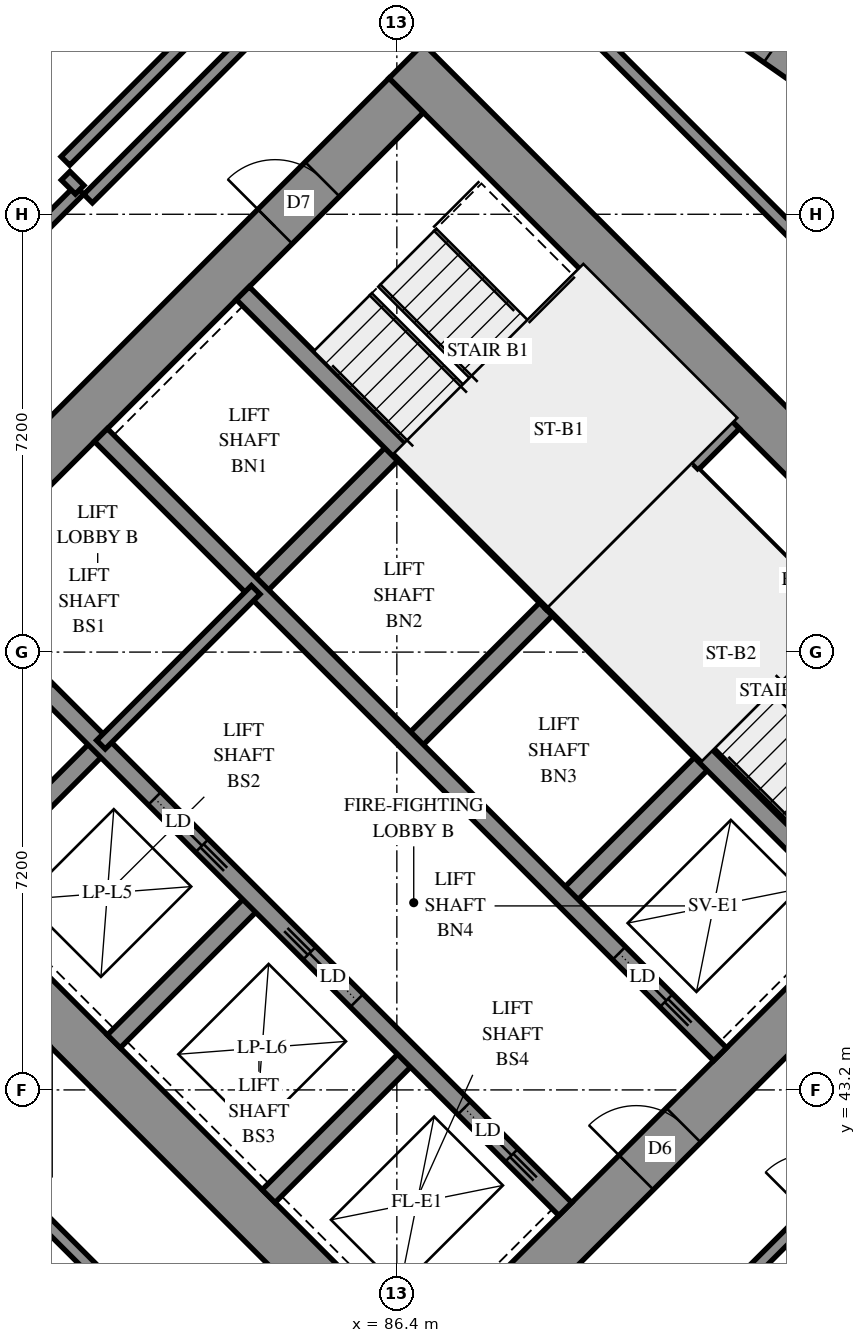
"""IFC4 building model, lengths in metres.
Left out: names, types, materials, properties, quantities, classifications, styles, units other than length and angle.
Written with IfcOpenShell. Run it as: python <this file> out.ifc"""

import sys

from ifc_helpers import new_model, si_unit, direction, frame, frame_2d, origin, place, context, subcontext, project, spatial, polyline, rectangle, outline, extrude, element, fill, save


model = new_model("IFC4")
c1 = context("Model", 3, precision=1e-05, world=origin(), true_north=direction((0.0, 1.0)))
c2 = subcontext(c1, "Body", "Model", "MODEL_VIEW")
j1 = project(units=[si_unit("LENGTHUNIT", "METRE"), si_unit("PLANEANGLEUNIT", "RADIAN")], contexts=[c1])
p1 = place(None, origin())
s1 = spatial("IfcSite", under=j1, at=p1, CompositionType="ELEMENT")
p2 = place(p1, origin())
s2 = spatial("IfcBuilding", under=s1, at=p2, CompositionType="ELEMENT")
p3 = place(p2, frame((0.0, 0.0, 115.2)))
s3 = spatial("IfcBuildingStorey", under=s2, at=p3, CompositionType="ELEMENT", Elevation=115.2)
p4 = place(p3, frame((75.806, 49.373, -0.3), z_axis=(0.0, 0.0, 1.0), x_axis=(0.7071067812, -0.7071067812, 0.0)))
e1 = element("IfcWall", 1, at=p4, inside=s3, PredefinedType="SHEAR", context=c2, shape_type="SweptSolid", body=[
    extrude(rectangle(XDim=16.0, YDim=0.8, at=frame_2d((8.0, 0.0))), origin(), (0.0, 0.0, 1.0), 2.7),
])
p5 = place(p3, frame((86.554, 60.121, -0.3), z_axis=(0.0, 0.0, 1.0), x_axis=(0.7071067812, -0.7071067812, 0.0)))
e2 = element("IfcWall", 2, at=p5, inside=s3, PredefinedType="SHEAR", context=c2, shape_type="SweptSolid", body=[
    extrude(rectangle(XDim=16.0, YDim=0.8, at=frame_2d((8.0, 0.0))), origin(), (0.0, 0.0, 1.0), 2.7),
])
p6 = place(p5, frame((10.8, 0.0, 0.3)))
e3 = element("IfcOpeningElement", 3, at=p6, cuts=e2, PredefinedType="OPENING", context=c2, shape_type="SweptSolid", body=[
    extrude(rectangle(XDim=0.8, YDim=2.1, at=frame_2d((0.4, 1.05))), frame((0.0, 0.41, 0.0), z_axis=(0.0, -1.0, 0.0), x_axis=(1.0, 0.0, 0.0)), (0.0, 0.0, 1.0), 0.82),
])
p7 = place(p3, frame((76.372, 49.373, -0.3), z_axis=(0.0, 0.0, 1.0), x_axis=(0.7071067812, 0.7071067812, 0.0)))
e4 = element("IfcWall", 4, at=p7, inside=s3, PredefinedType="SHEAR", context=c2, shape_type="SweptSolid", body=[
    extrude(rectangle(XDim=14.4, YDim=0.8, at=frame_2d((7.2, 0.0))), origin(), (0.0, 0.0, 1.0), 2.7),
])
p8 = place(p7, frame((4.55, 0.0, 0.3)))
e5 = element("IfcOpeningElement", 5, at=p8, cuts=e4, PredefinedType="OPENING", context=c2, shape_type="SweptSolid", body=[
    extrude(rectangle(XDim=1.1, YDim=2.1, at=frame_2d((0.55, 1.05))), frame((0.0, 0.41, 0.0), z_axis=(0.0, -1.0, 0.0), x_axis=(1.0, 0.0, 0.0)), (0.0, 0.0, 1.0), 0.82),
])
p9 = place(p7, frame((11.35, 0.0, 0.3)))
e6 = element("IfcOpeningElement", 6, at=p9, cuts=e4, PredefinedType="OPENING", context=c2, shape_type="SweptSolid", body=[
    extrude(rectangle(XDim=1.1, YDim=2.1, at=frame_2d((0.55, 1.05))), frame((0.0, 0.41, 0.0), z_axis=(0.0, -1.0, 0.0), x_axis=(1.0, 0.0, 0.0)), (0.0, 0.0, 1.0), 0.82),
])
p10 = place(p3, frame((87.12, 38.625, -0.3), z_axis=(0.0, 0.0, 1.0), x_axis=(0.7071067812, 0.7071067812, 0.0)))
e7 = element("IfcWall", 7, at=p10, inside=s3, PredefinedType="SHEAR", context=c2, shape_type="SweptSolid", body=[
    extrude(rectangle(XDim=14.4, YDim=0.8, at=frame_2d((7.2, 0.0))), origin(), (0.0, 0.0, 1.0), 2.7),
])
p11 = place(p10, frame((4.55, 0.0, 0.3)))
e8 = element("IfcOpeningElement", 8, at=p11, cuts=e7, PredefinedType="OPENING", context=c2, shape_type="SweptSolid", body=[
    extrude(rectangle(XDim=1.1, YDim=2.1, at=frame_2d((0.55, 1.05))), frame((0.0, 0.41, 0.0), z_axis=(0.0, -1.0, 0.0), x_axis=(1.0, 0.0, 0.0)), (0.0, 0.0, 1.0), 0.82),
])
p12 = place(p10, frame((11.35, 0.0, 0.3)))
e9 = element("IfcOpeningElement", 9, at=p12, cuts=e7, PredefinedType="OPENING", context=c2, shape_type="SweptSolid", body=[
    extrude(rectangle(XDim=1.1, YDim=2.1, at=frame_2d((0.55, 1.05))), frame((0.0, 0.41, 0.0), z_axis=(0.0, -1.0, 0.0), x_axis=(1.0, 0.0, 0.0)), (0.0, 0.0, 1.0), 0.82),
])
for number, where, z_axis, x_axis in (
    (10, (79.2, 46.544, 0.0), (0.0, 0.0, 1.0), (0.707, 0.707, 0.0)),
    (11, (84.079, 51.423, 0.0), (0.0, 0.0, 1.0), (0.707, 0.707, 0.0)),
):
    element("IfcWall", number, at=place(p3, frame(where, z_axis=z_axis, x_axis=x_axis)), inside=s3, PredefinedType="SOLIDWALL", context=c2, shape_type="SweptSolid", body=[
        extrude(rectangle(XDim=3.3, YDim=0.3, at=frame_2d((1.65, 0.0))), origin(), (0.0, 0.0, 1.0), 3.1),
    ])
p13 = place(p3, frame((81.746, 43.999, 0.0), z_axis=(0.0, 0.0, 1.0), x_axis=(0.7071067812, 0.7071067812, 0.0)))
e12 = element("IfcWall", 12, at=p13, inside=s3, PredefinedType="SOLIDWALL", context=c2, shape_type="SweptSolid", body=[
    extrude(rectangle(XDim=3.3, YDim=0.3, at=frame_2d((1.65, 0.0))), origin(), (0.0, 0.0, 1.0), 3.1),
])
p14 = place(p3, frame((86.625, 48.878, 0.0), z_axis=(0.0, 0.0, 1.0), x_axis=(0.7071067812, 0.7071067812, 0.0)))
e13 = element("IfcWall", 13, at=p14, inside=s3, PredefinedType="SOLIDWALL", context=c2, shape_type="SweptSolid", body=[
    extrude(rectangle(XDim=3.3, YDim=0.3, at=frame_2d((1.65, 0.0))), origin(), (0.0, 0.0, 1.0), 3.1),
])
p15 = place(p3, frame((84.291, 41.453, 0.0), z_axis=(0.0, 0.0, 1.0), x_axis=(0.7071067812, 0.7071067812, 0.0)))
e14 = element("IfcWall", 14, at=p15, inside=s3, PredefinedType="SOLIDWALL", context=c2, shape_type="SweptSolid", body=[
    extrude(rectangle(XDim=3.3, YDim=0.3, at=frame_2d((1.65, 0.0))), origin(), (0.0, 0.0, 1.0), 3.1),
])
p16 = place(p3, frame((89.17, 46.332, 0.0), z_axis=(0.0, 0.0, 1.0), x_axis=(0.7071067812, 0.7071067812, 0.0)))
e15 = element("IfcWall", 15, at=p16, inside=s3, PredefinedType="SOLIDWALL", context=c2, shape_type="SweptSolid", body=[
    extrude(rectangle(XDim=3.3, YDim=0.3, at=frame_2d((1.65, 0.0))), origin(), (0.0, 0.0, 1.0), 3.1),
])
p17 = place(p3, frame((78.988, 51.423, 0.0), z_axis=(0.0, 0.0, 1.0), x_axis=(0.7071067812, -0.7071067812, 0.0)))
e16 = element("IfcWall", 16, at=p17, inside=s3, PredefinedType="SOLIDWALL", context=c2, shape_type="SweptSolid", body=[
    extrude(rectangle(XDim=14.4, YDim=0.3, at=frame_2d((7.2, 0.0))), origin(), (0.0, 0.0, 1.0), 3.1),
])
p18 = place(p17, frame((1.25, 0.0, 0.0)))
e17 = element("IfcOpeningElement", 17, at=p18, cuts=e16, PredefinedType="OPENING", context=c2, shape_type="SweptSolid", body=[
    extrude(rectangle(XDim=1.1, YDim=2.1, at=frame_2d((0.55, 1.05))), frame((0.0, 0.16, 0.0), z_axis=(0.0, -1.0, 0.0), x_axis=(1.0, 0.0, 0.0)), (0.0, 0.0, 1.0), 0.32),
])
p19 = place(p17, frame((4.85, 0.0, 0.0)))
e18 = element("IfcOpeningElement", 18, at=p19, cuts=e16, PredefinedType="OPENING", context=c2, shape_type="SweptSolid", body=[
    extrude(rectangle(XDim=1.1, YDim=2.1, at=frame_2d((0.55, 1.05))), frame((0.0, 0.16, 0.0), z_axis=(0.0, -1.0, 0.0), x_axis=(1.0, 0.0, 0.0)), (0.0, 0.0, 1.0), 0.32),
])
p20 = place(p17, frame((8.45, 0.0, 0.0)))
e19 = element("IfcOpeningElement", 19, at=p20, cuts=e16, PredefinedType="OPENING", context=c2, shape_type="SweptSolid", body=[
    extrude(rectangle(XDim=1.1, YDim=2.1, at=frame_2d((0.55, 1.05))), frame((0.0, 0.16, 0.0), z_axis=(0.0, -1.0, 0.0), x_axis=(1.0, 0.0, 0.0)), (0.0, 0.0, 1.0), 0.32),
])
p21 = place(p17, frame((12.05, 0.0, 0.0)))
e20 = element("IfcOpeningElement", 20, at=p21, cuts=e16, PredefinedType="OPENING", context=c2, shape_type="SweptSolid", body=[
    extrude(rectangle(XDim=1.1, YDim=2.1, at=frame_2d((0.55, 1.05))), frame((0.0, 0.16, 0.0), z_axis=(0.0, -1.0, 0.0), x_axis=(1.0, 0.0, 0.0)), (0.0, 0.0, 1.0), 0.32),
])
p22 = place(p3, frame((81.534, 53.969, 0.0), z_axis=(0.0, 0.0, 1.0), x_axis=(0.707103309, -0.7071102534, 0.0)))
e21 = element("IfcWall", 21, at=p22, inside=s3, PredefinedType="SOLIDWALL", context=c2, shape_type="SweptSolid", body=[
    extrude(rectangle(XDim=14.4, YDim=0.3, at=frame_2d((7.2, 0.0))), origin(), (0.0, 0.0, 1.0), 3.1),
])
p23 = place(p22, frame((12.05, 0.0, 0.0)))
e22 = element("IfcOpeningElement", 22, at=p23, cuts=e21, PredefinedType="OPENING", context=c2, shape_type="SweptSolid", body=[
    extrude(rectangle(XDim=1.1, YDim=2.1, at=frame_2d((0.55, 1.05))), frame((0.0, 0.16, 0.0), z_axis=(0.0, -1.0, 0.0), x_axis=(1.0, 0.0, 0.0)), (0.0, 0.0, 1.0), 0.32),
])
for number, where, z_axis, x_axis in (
    (23, (83.867, 56.302, 0.0), (0.0, 0.0, 1.0), (0.707, -0.707, 0.0)),
    (24, (88.958, 51.211, 0.0), (0.0, 0.0, 1.0), (0.707, -0.707, 0.0)),
):
    element("IfcWall", number, at=place(p3, frame(where, z_axis=z_axis, x_axis=x_axis)), inside=s3, PredefinedType="SOLIDWALL", context=c2, shape_type="SweptSolid", body=[
        extrude(rectangle(XDim=7.2, YDim=0.3, at=frame_2d((3.6, 0.0))), origin(), (0.0, 0.0, 1.0), 3.1),
    ])
p24 = place(p3, frame((88.958, 51.211, 0.0), z_axis=(0.0, 0.0, 1.0), x_axis=(0.7071067812, 0.7071067812, 0.0)))
e25 = element("IfcWall", 25, at=p24, inside=s3, PredefinedType="SOLIDWALL", context=c2, shape_type="SweptSolid", body=[
    extrude(rectangle(XDim=4.2, YDim=0.3, at=frame_2d((2.1, 0.0))), origin(), (0.0, 0.0, 1.0), 3.1),
])
p25 = place(p3, frame((94.058, 59.297, 0.0), z_axis=(0.0, 0.0, 1.0), x_axis=(-0.8193240603, 0.5733306936, 0.0)))
e26 = element("IfcWall", 26, at=p25, inside=s3, PredefinedType="SOLIDWALL", context=c2, shape_type="SweptSolid", body=[
    extrude(outline(polyline([(-0.049, -0.275), (3.418, -0.275), (3.515, 0.275), (0.049, 0.275), (-0.049, -0.275)])), origin(), (0.0, 0.0, 1.0), 3.1),
])
p26 = place(p25, frame((1.789, 0.0, 0.5)))
e27 = element("IfcOpeningElement", 27, at=p26, cuts=e26, PredefinedType="OPENING", context=c2, shape_type="SweptSolid", body=[
    extrude(rectangle(XDim=1.2, YDim=2.45, at=frame_2d((0.6, 1.225))), frame((0.0, 0.285, 0.0), z_axis=(0.0, -1.0, 0.0), x_axis=(1.0, 0.0, 0.0)), (0.0, 0.0, 1.0), 0.57),
])
p27 = place(p3, frame((91.313, 53.354, 0.0), z_axis=(0.0, 0.0, 1.0), x_axis=(0.7071067812, -0.7071067812, 0.0)))
e28 = element("IfcWall", 28, at=p27, inside=s3, PredefinedType="PARTITIONING", context=c2, shape_type="SweptSolid", body=[
    extrude(rectangle(XDim=5.65, YDim=0.15, at=frame_2d((2.825, 0.0))), origin(), (0.0, 0.0, 1.0), 3.1),
])
p28 = place(p3, frame((81.534, 48.878, 0.0), z_axis=(0.0, 0.0, 1.0), x_axis=(0.707092892, 0.7071206701, 0.0)))
e29 = element("IfcWall", 29, at=p28, inside=s3, PredefinedType="PARTITIONING", context=c2, shape_type="SweptSolid", body=[
    extrude(rectangle(XDim=3.6, YDim=0.2, at=frame_2d((1.8, 0.0))), origin(), (0.0, 0.0, 1.0), 3.1),
])
p29 = place(p3, frame((86.33, 33.311, 0.0), z_axis=(0.0, 0.0, 1.0), x_axis=(0.7071067812, 0.7071067812, 0.0)))
e30 = element("IfcWall", 30, at=p29, inside=s3, PredefinedType="PARTITIONING", context=c2, shape_type="SweptSolid", body=[
    extrude(rectangle(XDim=11.616, YDim=0.2, at=frame_2d((5.808, 0.0))), origin(), (0.0, 0.0, 1.0), 3.1),
])
p30 = place(p3, frame((86.835, 34.806, 0.0), z_axis=(0.0, 0.0, 1.0), x_axis=(0.7071067812, 0.7071067812, 0.0)))
e31 = element("IfcWall", 31, at=p30, inside=s3, PredefinedType="PARTITIONING", context=c2, shape_type="SweptSolid", body=[
    extrude(rectangle(XDim=10.201, YDim=0.2, at=frame_2d((5.1, 0.0))), origin(), (0.0, 0.0, 1.0), 3.1),
])
p31 = place(p30, frame((8.959, 0.0, 0.0)))
e32 = element("IfcOpeningElement", 32, at=p31, cuts=e31, PredefinedType="OPENING", context=c2, shape_type="SweptSolid", body=[
    extrude(rectangle(XDim=1.0, YDim=2.1, at=frame_2d((0.5, 1.05))), frame((0.0, 0.11, 0.0), z_axis=(0.0, -1.0, 0.0), x_axis=(1.0, 0.0, 0.0)), (0.0, 0.0, 1.0), 0.22),
])
p32 = place(p3, frame((80.949, 58.477, 0.0), z_axis=(0.0, 0.0, 1.0), x_axis=(0.7071067812, 0.7071067812, 0.0)))
e33 = element("IfcWall", 33, at=p32, inside=s3, PredefinedType="PARTITIONING", context=c2, shape_type="SweptSolid", body=[
    extrude(rectangle(XDim=9.241, YDim=0.2, at=frame_2d((4.621, 0.0))), origin(), (0.0, 0.0, 1.0), 3.1),
])
p33 = place(p3, frame((81.322, 57.858, 0.0), z_axis=(0.0, 0.0, 1.0), x_axis=(0.7069785544, 0.7072349848, 0.0)))
e34 = element("IfcWall", 34, at=p33, inside=s3, PredefinedType="PARTITIONING", context=c2, shape_type="SweptSolid", body=[
    extrude(rectangle(XDim=7.799, YDim=0.2, at=frame_2d((3.9, 0.0))), origin(), (0.0, 0.0, 1.0), 3.1),
])
p34 = place(p3, frame((88.889, 61.315, 0.0), z_axis=(0.0, 0.0, 1.0), x_axis=(0.7071067812, -0.7071067812, 0.0)))
e35 = element("IfcWall", 35, at=p34, inside=s3, PredefinedType="PARTITIONING", context=c2, shape_type="SweptSolid", body=[
    extrude(rectangle(XDim=7.187, YDim=0.2, at=frame_2d((3.594, 0.0))), origin(), (0.0, 0.0, 1.0), 3.1),
])
p35 = place(p3, frame((80.197, 41.453, 0.0), z_axis=(0.0, 0.0, 1.0), x_axis=(0.7071067812, -0.7071067812, 0.0)))
e36 = element("IfcWall", 36, at=p35, inside=s3, PredefinedType="PARTITIONING", context=c2, shape_type="SweptSolid", body=[
    extrude(rectangle(XDim=6.488, YDim=0.2, at=frame_2d((3.244, 0.0))), origin(), (0.0, 0.0, 1.0), 3.1),
])
p36 = place(p3, frame((79.802, 56.623, 0.0), z_axis=(0.0, 0.0, 1.0), x_axis=(0.7071067812, 0.7071067812, 0.0)))
e37 = element("IfcWall", 37, at=p36, inside=s3, PredefinedType="PARTITIONING", context=c2, shape_type="SweptSolid", body=[
    extrude(rectangle(XDim=1.949, YDim=0.2, at=frame_2d((0.974, 0.0))), origin(), (0.0, 0.0, 1.0), 3.1),
])
p37 = place(p3, frame((80.953, 58.233, 0.0), z_axis=(0.0, 0.0, 1.0), x_axis=(0.7071067812, -0.7071067812, 0.0)))
e38 = element("IfcWall", 38, at=p37, inside=s3, PredefinedType="PARTITIONING", context=c2, shape_type="SweptSolid", body=[
    extrude(rectangle(XDim=0.325, YDim=0.2, at=frame_2d((0.163, 0.0))), origin(), (0.0, 0.0, 1.0), 3.1),
])
p38 = place(p26, origin())
e39 = element("IfcWindow", 39, at=p38, inside=s3, PartitioningType="SINGLE_PANEL", PredefinedType="WINDOW", context=c2, shape_type="SweptSolid", body=[
    extrude(rectangle(XDim=1.2, YDim=2.45, at=frame_2d((0.6, 1.225))), frame((0.0, 0.155, 0.0), z_axis=(0.0, -1.0, 0.0), x_axis=(1.0, 0.0, 0.0)), (0.0, 0.0, 1.0), 0.06),
])
fill(e27, e39)
p39 = place(p11, origin())
e40 = element("IfcDoor", 40, at=p39, inside=s3, OperationType="DOUBLE_DOOR_SINGLE_SWING", PredefinedType="DOOR", context=c2, shape_type="SweptSolid", body=[
    extrude(rectangle(XDim=1.1, YDim=2.1, at=frame_2d((0.55, 1.05))), frame((0.0, 0.025, 0.0), z_axis=(0.0, -1.0, 0.0), x_axis=(1.0, 0.0, 0.0)), (0.0, 0.0, 1.0), 0.05),
])
fill(e8, e40)
p40 = place(p9, origin())
e41 = element("IfcDoor", 41, at=p40, inside=s3, OperationType="SINGLE_SWING_LEFT", PredefinedType="DOOR", context=c2, shape_type="SweptSolid", body=[
    extrude(rectangle(XDim=1.1, YDim=2.1, at=frame_2d((0.55, 1.05))), frame((0.0, 0.025, 0.0), z_axis=(0.0, -1.0, 0.0), x_axis=(1.0, 0.0, 0.0)), (0.0, 0.0, 1.0), 0.05),
])
fill(e6, e41)
p41 = place(p19, origin())
e42 = element("IfcDoor", 42, at=p41, inside=s3, OperationType="SLIDING_TO_RIGHT", PredefinedType="DOOR", context=c2, shape_type="SweptSolid", body=[
    extrude(rectangle(XDim=1.1, YDim=2.1, at=frame_2d((0.55, 1.05))), frame((0.0, 0.025, 0.0), z_axis=(0.0, -1.0, 0.0), x_axis=(1.0, 0.0, 0.0)), (0.0, 0.0, 1.0), 0.05),
])
fill(e18, e42)
p42 = place(p20, origin())
e43 = element("IfcDoor", 43, at=p42, inside=s3, OperationType="SLIDING_TO_LEFT", PredefinedType="DOOR", context=c2, shape_type="SweptSolid", body=[
    extrude(rectangle(XDim=1.1, YDim=2.1, at=frame_2d((0.55, 1.05))), frame((0.0, 0.025, 0.0), z_axis=(0.0, -1.0, 0.0), x_axis=(1.0, 0.0, 0.0)), (0.0, 0.0, 1.0), 0.05),
])
fill(e19, e43)
p43 = place(p21, origin())
e44 = element("IfcDoor", 44, at=p43, inside=s3, OperationType="SLIDING_TO_RIGHT", PredefinedType="DOOR", context=c2, shape_type="SweptSolid", body=[
    extrude(rectangle(XDim=1.1, YDim=2.1, at=frame_2d((0.55, 1.05))), frame((0.0, 0.025, 0.0), z_axis=(0.0, -1.0, 0.0), x_axis=(1.0, 0.0, 0.0)), (0.0, 0.0, 1.0), 0.05),
])
fill(e20, e44)
p44 = place(p23, origin())
e45 = element("IfcDoor", 45, at=p44, inside=s3, OperationType="SLIDING_TO_RIGHT", PredefinedType="DOOR", context=c2, shape_type="SweptSolid", body=[
    extrude(rectangle(XDim=1.1, YDim=2.1, at=frame_2d((0.55, 1.05))), frame((0.0, 0.025, 0.0), z_axis=(0.0, -1.0, 0.0), x_axis=(1.0, 0.0, 0.0)), (0.0, 0.0, 1.0), 0.05),
])
fill(e22, e45)
save(model, sys.argv[1])
